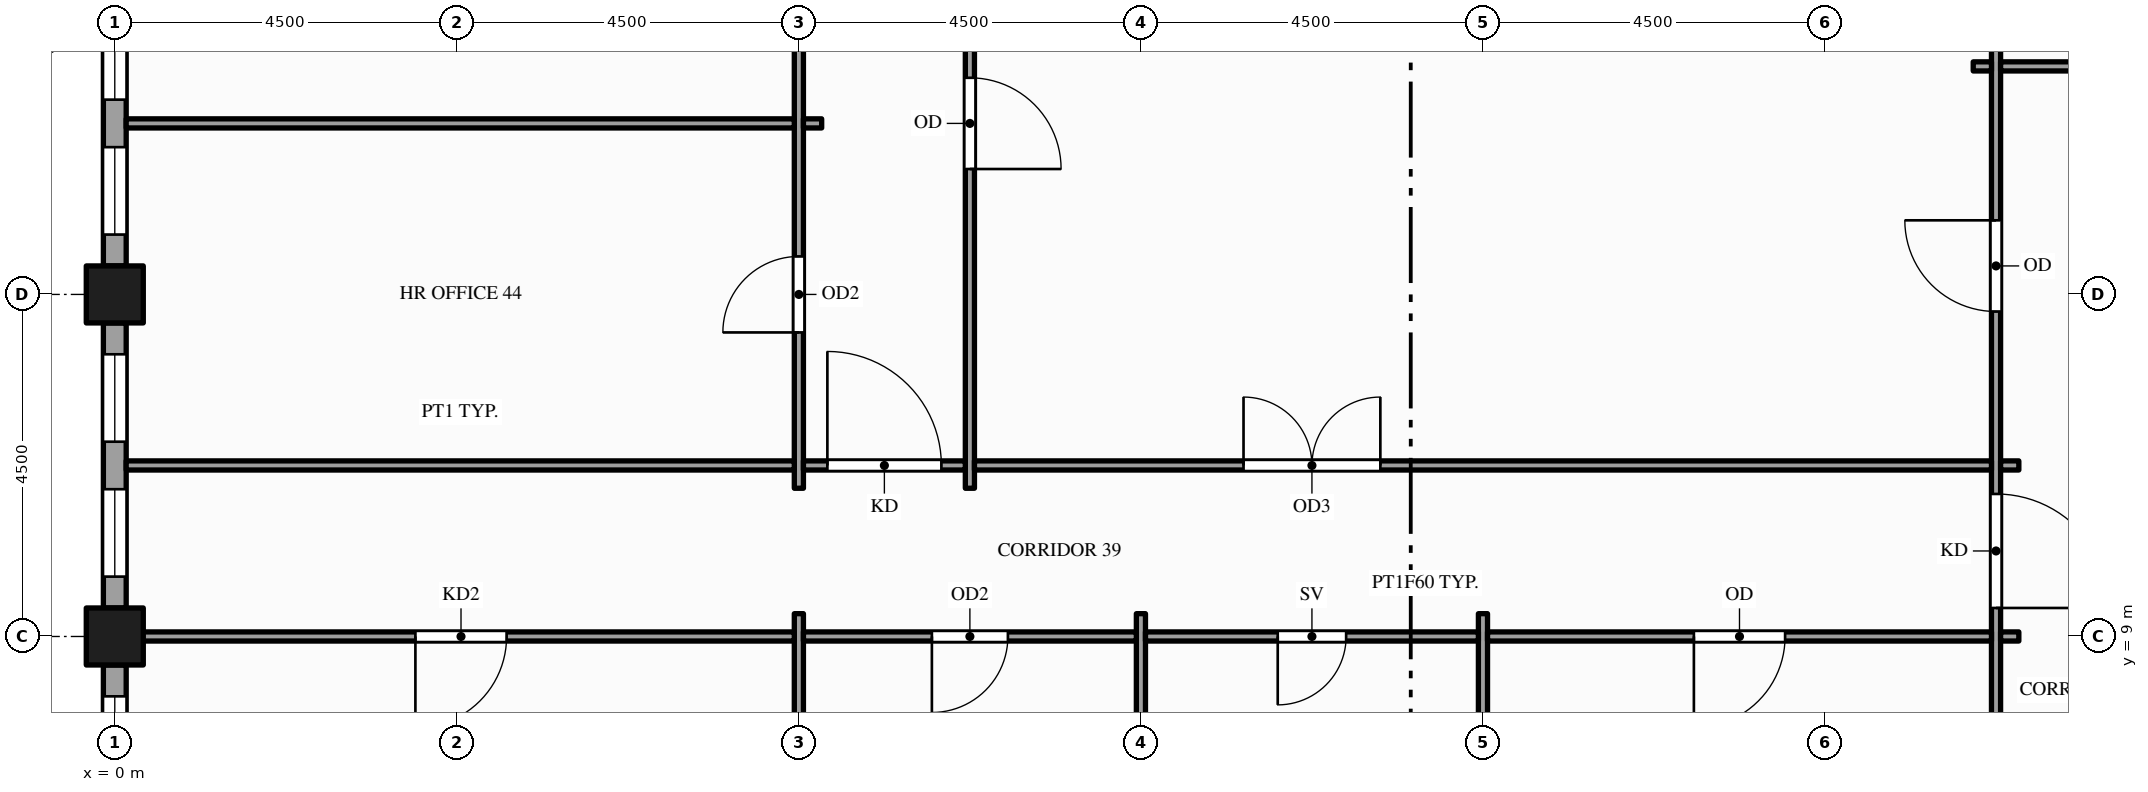
"""IFC4 building model, lengths in metres.
Left out: names, types, materials, properties, quantities, classifications, styles, units other than length and angle.
Written with IfcOpenShell. Run it as: python <this file> out.ifc"""

import sys

from ifc_helpers import new_model, si_unit, direction, frame, frame_2d, origin, origin_2d, place, context, subcontext, project, spatial, rectangle, hollow_rectangle, extrude, element, fill, save


model = new_model("IFC4")
c1 = context("Model", 3, precision=1e-05, world=origin(), true_north=direction((0.0, 1.0)))
c2 = subcontext(c1, "Body", "Model", "MODEL_VIEW")
j1 = project(units=[si_unit("LENGTHUNIT", "METRE"), si_unit("PLANEANGLEUNIT", "RADIAN")], contexts=[c1])
p1 = place(None, origin())
s1 = spatial("IfcSite", under=j1, at=p1, CompositionType="ELEMENT")
p2 = place(p1, origin())
s2 = spatial("IfcBuilding", under=s1, at=p2, CompositionType="ELEMENT")
p3 = place(p2, frame((0.0, 0.0, 195.0)))
s3 = spatial("IfcBuildingStorey", under=s2, at=p3, CompositionType="ELEMENT", Elevation=195.0)
for number, where, z_axis, x_axis in (
    (1, (0.0, 9.0, -0.15), (0.0, 0.0, 1.0), (1.0, 0.0, 0.0)),
    (2, (0.0, 13.5, -0.15), (0.0, 0.0, 1.0), (1.0, 0.0, 0.0)),
):
    element("IfcColumn", number, at=place(p3, frame(where, z_axis=z_axis, x_axis=x_axis)), inside=s3, PredefinedType="COLUMN", context=c2, shape_type="SweptSolid", body=[
        extrude(hollow_rectangle(XDim=0.75, YDim=0.75, WallThickness=0.036, at=origin_2d()), origin(), (0.0, 0.0, 1.0), 4.0),
    ])
p4 = place(p3, frame((0.0, 17.625, 0.0), z_axis=(0.0, 0.0, 1.0), x_axis=(0.0, -1.0, 0.0)))
e3 = element("IfcWall", 3, at=p4, inside=s3, PredefinedType="STANDARD", context=c2, shape_type="SweptSolid", body=[
    extrude(rectangle(XDim=3.75, YDim=0.3, at=frame_2d((1.875, 0.0))), origin(), (0.0, 0.0, 1.0), 3.157),
])
p5 = place(p4, frame((0.413, 0.0, 0.9)))
e4 = element("IfcOpeningElement", 4, at=p5, cuts=e3, PredefinedType="OPENING", context=c2, shape_type="SweptSolid", body=[
    extrude(rectangle(XDim=1.15, YDim=2.0, at=frame_2d((0.575, 1.0))), frame((0.0, 0.16, 0.0), z_axis=(0.0, -1.0, 0.0), x_axis=(1.0, 0.0, 0.0)), (0.0, 0.0, 1.0), 0.32),
])
p6 = place(p4, frame((2.188, 0.0, 0.9)))
e5 = element("IfcOpeningElement", 5, at=p6, cuts=e3, PredefinedType="OPENING", context=c2, shape_type="SweptSolid", body=[
    extrude(rectangle(XDim=1.15, YDim=2.0, at=frame_2d((0.575, 1.0))), frame((0.0, 0.16, 0.0), z_axis=(0.0, -1.0, 0.0), x_axis=(1.0, 0.0, 0.0)), (0.0, 0.0, 1.0), 0.32),
])
p7 = place(p3, frame((0.0, 13.125, 0.0), z_axis=(0.0, 0.0, 1.0), x_axis=(0.0, -1.0, 0.0)))
e6 = element("IfcWall", 6, at=p7, inside=s3, PredefinedType="STANDARD", context=c2, shape_type="SweptSolid", body=[
    extrude(rectangle(XDim=3.75, YDim=0.3, at=frame_2d((1.875, 0.0))), origin(), (0.0, 0.0, 1.0), 3.157),
])
p8 = place(p7, frame((0.413, 0.0, 0.9)))
e7 = element("IfcOpeningElement", 7, at=p8, cuts=e6, PredefinedType="OPENING", context=c2, shape_type="SweptSolid", body=[
    extrude(rectangle(XDim=1.15, YDim=2.0, at=frame_2d((0.575, 1.0))), frame((0.0, 0.16, 0.0), z_axis=(0.0, -1.0, 0.0), x_axis=(1.0, 0.0, 0.0)), (0.0, 0.0, 1.0), 0.32),
])
p9 = place(p7, frame((2.188, 0.0, 0.9)))
e8 = element("IfcOpeningElement", 8, at=p9, cuts=e6, PredefinedType="OPENING", context=c2, shape_type="SweptSolid", body=[
    extrude(rectangle(XDim=1.15, YDim=2.0, at=frame_2d((0.575, 1.0))), frame((0.0, 0.16, 0.0), z_axis=(0.0, -1.0, 0.0), x_axis=(1.0, 0.0, 0.0)), (0.0, 0.0, 1.0), 0.32),
])
p10 = place(p3, frame((0.0, 8.625, 0.0), z_axis=(0.0, 0.0, 1.0), x_axis=(0.0, -1.0, 0.0)))
e9 = element("IfcWall", 9, at=p10, inside=s3, PredefinedType="STANDARD", context=c2, shape_type="SweptSolid", body=[
    extrude(rectangle(XDim=3.75, YDim=0.3, at=frame_2d((1.875, 0.0))), origin(), (0.0, 0.0, 1.0), 3.157),
])
p11 = place(p10, frame((0.413, 0.0, 0.9)))
e10 = element("IfcOpeningElement", 10, at=p11, cuts=e9, PredefinedType="OPENING", context=c2, shape_type="SweptSolid", body=[
    extrude(rectangle(XDim=1.15, YDim=2.0, at=frame_2d((0.575, 1.0))), frame((0.0, 0.16, 0.0), z_axis=(0.0, -1.0, 0.0), x_axis=(1.0, 0.0, 0.0)), (0.0, 0.0, 1.0), 0.32),
])
p12 = place(p10, frame((2.188, 0.0, 0.9)))
e11 = element("IfcOpeningElement", 11, at=p12, cuts=e9, PredefinedType="OPENING", context=c2, shape_type="SweptSolid", body=[
    extrude(rectangle(XDim=1.15, YDim=2.0, at=frame_2d((0.575, 1.0))), frame((0.0, 0.16, 0.0), z_axis=(0.0, -1.0, 0.0), x_axis=(1.0, 0.0, 0.0)), (0.0, 0.0, 1.0), 0.32),
])
p13 = place(p3, frame((9.0, 3.875, 0.0), z_axis=(0.0, 0.0, 1.0), x_axis=(0.0, 1.0, 0.0)))
e12 = element("IfcWall", 12, at=p13, inside=s3, PredefinedType="PARTITIONING", context=c2, shape_type="SweptSolid", body=[
    extrude(rectangle(XDim=5.425, YDim=0.12, at=frame_2d((2.712, 0.0))), origin(), (0.0, 0.0, 1.0), 2.87),
])
p14 = place(p3, frame((9.0, 10.95, 0.0), z_axis=(0.0, 0.0, 1.0), x_axis=(0.0, 1.0, 0.0)))
e13 = element("IfcWall", 13, at=p14, inside=s3, PredefinedType="PARTITIONING", context=c2, shape_type="SweptSolid", body=[
    extrude(rectangle(XDim=20.85, YDim=0.12, at=frame_2d((10.425, 0.0))), origin(), (0.0, 0.0, 1.0), 2.6),
])
p15 = place(p14, frame((2.05, 0.0, 0.0)))
e14 = element("IfcOpeningElement", 14, at=p15, cuts=e13, PredefinedType="OPENING", context=c2, shape_type="SweptSolid", body=[
    extrude(rectangle(XDim=1.0, YDim=2.1, at=frame_2d((0.5, 1.05))), frame((0.0, 0.07, 0.0), z_axis=(0.0, -1.0, 0.0), x_axis=(1.0, 0.0, 0.0)), (0.0, 0.0, 1.0), 0.14),
])
p16 = place(p14, frame((6.55, 0.0, 0.0)))
e15 = element("IfcOpeningElement", 15, at=p16, cuts=e13, PredefinedType="OPENING", context=c2, shape_type="SweptSolid", body=[
    extrude(rectangle(XDim=1.0, YDim=2.1, at=frame_2d((0.5, 1.05))), frame((0.0, 0.07, 0.0), z_axis=(0.0, -1.0, 0.0), x_axis=(1.0, 0.0, 0.0)), (0.0, 0.0, 1.0), 0.14),
])
p17 = place(p14, frame((12.205, 0.0, 0.0)))
e16 = element("IfcOpeningElement", 16, at=p17, cuts=e13, PredefinedType="OPENING", context=c2, shape_type="SweptSolid", body=[
    extrude(rectangle(XDim=1.0, YDim=2.1, at=frame_2d((0.5, 1.05))), frame((0.0, 0.07, 0.0), z_axis=(0.0, -1.0, 0.0), x_axis=(1.0, 0.0, 0.0)), (0.0, 0.0, 1.0), 0.14),
])
p18 = place(p3, frame((11.25, 10.95, 0.0), z_axis=(0.0, 0.0, 1.0), x_axis=(0.0, 1.0, 0.0)))
e17 = element("IfcWall", 17, at=p18, inside=s3, PredefinedType="PARTITIONING", context=c2, shape_type="SweptSolid", body=[
    extrude(rectangle(XDim=20.85, YDim=0.12, at=frame_2d((10.425, 0.0))), origin(), (0.0, 0.0, 1.0), 2.6),
])
p19 = place(p18, frame((17.8, 0.0, 0.0)))
e18 = element("IfcOpeningElement", 18, at=p19, cuts=e17, PredefinedType="OPENING", context=c2, shape_type="SweptSolid", body=[
    extrude(rectangle(XDim=1.0, YDim=2.1, at=frame_2d((0.5, 1.05))), frame((0.0, 0.07, 0.0), z_axis=(0.0, -1.0, 0.0), x_axis=(1.0, 0.0, 0.0)), (0.0, 0.0, 1.0), 0.14),
])
p20 = place(p18, frame((4.2, 0.0, 0.0)))
e19 = element("IfcOpeningElement", 19, at=p20, cuts=e17, PredefinedType="OPENING", context=c2, shape_type="SweptSolid", body=[
    extrude(rectangle(XDim=1.2, YDim=2.1, at=frame_2d((0.6, 1.05))), frame((0.0, 0.07, 0.0), z_axis=(0.0, -1.0, 0.0), x_axis=(1.0, 0.0, 0.0)), (0.0, 0.0, 1.0), 0.14),
])
for number, where, z_axis, x_axis in (
    (20, (13.5, 0.15, 0.0), (0.0, 0.0, 1.0), (0.0, 1.0, 0.0)),
    (21, (18.0, 0.15, 0.0), (0.0, 0.0, 1.0), (0.0, 1.0, 0.0)),
):
    element("IfcWall", number, at=place(p3, frame(where, z_axis=z_axis, x_axis=x_axis)), inside=s3, PredefinedType="PARTITIONING", context=c2, shape_type="SweptSolid", body=[
        extrude(rectangle(XDim=9.15, YDim=0.12, at=frame_2d((4.575, 0.0))), origin(), (0.0, 0.0, 1.0), 2.87),
    ])
p21 = place(p3, frame((24.75, -1.35, 0.0), z_axis=(0.0, 0.0, 1.0), x_axis=(0.0, 1.0, 0.0)))
e22 = element("IfcWall", 22, at=p21, inside=s3, PredefinedType="PARTITIONING", context=c2, shape_type="SweptSolid", body=[
    extrude(rectangle(XDim=24.101, YDim=0.12, at=frame_2d((12.05, 0.0))), origin(), (0.0, 0.0, 1.0), 2.76),
])
p22 = place(p21, frame((10.725, 0.0, 0.0)))
e23 = element("IfcOpeningElement", 23, at=p22, cuts=e22, PredefinedType="OPENING", context=c2, shape_type="SweptSolid", body=[
    extrude(rectangle(XDim=1.5, YDim=2.1, at=frame_2d((0.75, 1.05))), frame((0.0, 0.07, 0.0), z_axis=(0.0, -1.0, 0.0), x_axis=(1.0, 0.0, 0.0)), (0.0, 0.0, 1.0), 0.14),
])
p23 = place(p21, frame((14.625, 0.0, 0.0)))
e24 = element("IfcOpeningElement", 24, at=p23, cuts=e22, PredefinedType="OPENING", context=c2, shape_type="SweptSolid", body=[
    extrude(rectangle(XDim=1.2, YDim=2.1, at=frame_2d((0.6, 1.05))), frame((0.0, 0.07, 0.0), z_axis=(0.0, -1.0, 0.0), x_axis=(1.0, 0.0, 0.0)), (0.0, 0.0, 1.0), 0.14),
])
p24 = place(p3, frame((0.15, 9.0, 0.0), z_axis=(0.0, 0.0, 1.0), x_axis=(1.0, 0.0, 0.0)))
e25 = element("IfcWall", 25, at=p24, inside=s3, PredefinedType="PARTITIONING", context=c2, shape_type="SweptSolid", body=[
    extrude(rectangle(XDim=8.79, YDim=0.12, at=frame_2d((4.395, 0.0))), origin(), (0.0, 0.0, 1.0), 2.87),
])
p25 = place(p24, frame((3.805, 0.0, 0.0)))
e26 = element("IfcOpeningElement", 26, at=p25, cuts=e25, PredefinedType="OPENING", context=c2, shape_type="SweptSolid", body=[
    extrude(rectangle(XDim=1.2, YDim=2.1, at=frame_2d((0.6, 1.05))), frame((0.0, 0.07, 0.0), z_axis=(0.0, -1.0, 0.0), x_axis=(1.0, 0.0, 0.0)), (0.0, 0.0, 1.0), 0.14),
])
p26 = place(p3, frame((9.06, 9.0, 0.0), z_axis=(0.0, 0.0, 1.0), x_axis=(1.0, 0.0, 0.0)))
e27 = element("IfcWall", 27, at=p26, inside=s3, PredefinedType="PARTITIONING", context=c2, shape_type="SweptSolid", body=[
    extrude(rectangle(XDim=4.38, YDim=0.12, at=frame_2d((2.19, 0.0))), origin(), (0.0, 0.0, 1.0), 2.87),
])
p27 = place(p26, frame((1.69, 0.0, 0.0)))
e28 = element("IfcOpeningElement", 28, at=p27, cuts=e27, PredefinedType="OPENING", context=c2, shape_type="SweptSolid", body=[
    extrude(rectangle(XDim=1.0, YDim=2.1, at=frame_2d((0.5, 1.05))), frame((0.0, 0.07, 0.0), z_axis=(0.0, -1.0, 0.0), x_axis=(1.0, 0.0, 0.0)), (0.0, 0.0, 1.0), 0.14),
])
p28 = place(p3, frame((13.56, 9.0, 0.0), z_axis=(0.0, 0.0, 1.0), x_axis=(1.0, 0.0, 0.0)))
e29 = element("IfcWall", 29, at=p28, inside=s3, PredefinedType="PARTITIONING", context=c2, shape_type="SweptSolid", body=[
    extrude(rectangle(XDim=4.38, YDim=0.12, at=frame_2d((2.19, 0.0))), origin(), (0.0, 0.0, 1.0), 2.87),
])
p29 = place(p28, frame((1.74, 0.0, 0.0)))
e30 = element("IfcOpeningElement", 30, at=p29, cuts=e29, PredefinedType="OPENING", context=c2, shape_type="SweptSolid", body=[
    extrude(rectangle(XDim=0.9, YDim=2.1, at=frame_2d((0.45, 1.05))), frame((0.0, 0.07, 0.0), z_axis=(0.0, -1.0, 0.0), x_axis=(1.0, 0.0, 0.0)), (0.0, 0.0, 1.0), 0.14),
])
p30 = place(p3, frame((18.06, 9.0, 0.0), z_axis=(0.0, 0.0, 1.0), x_axis=(1.0, 0.0, 0.0)))
e31 = element("IfcWall", 31, at=p30, inside=s3, PredefinedType="PARTITIONING", context=c2, shape_type="SweptSolid", body=[
    extrude(rectangle(XDim=6.63, YDim=0.12, at=frame_2d((3.315, 0.0))), origin(), (0.0, 0.0, 1.0), 2.76),
])
p31 = place(p30, frame((2.715, 0.0, 0.0)))
e32 = element("IfcOpeningElement", 32, at=p31, cuts=e31, PredefinedType="OPENING", context=c2, shape_type="SweptSolid", body=[
    extrude(rectangle(XDim=1.2, YDim=2.1, at=frame_2d((0.6, 1.05))), frame((0.0, 0.07, 0.0), z_axis=(0.0, -1.0, 0.0), x_axis=(1.0, 0.0, 0.0)), (0.0, 0.0, 1.0), 0.14),
])
p32 = place(p3, frame((24.81, 9.0, 0.0), z_axis=(0.0, 0.0, 1.0), x_axis=(1.0, 0.0, 0.0)))
e33 = element("IfcWall", 33, at=p32, inside=s3, PredefinedType="PARTITIONING", context=c2, shape_type="SweptSolid", body=[
    extrude(rectangle(XDim=0.24, YDim=0.12, at=frame_2d((0.12, 0.0))), origin(), (0.0, 0.0, 1.0), 2.76),
])
p33 = place(p3, frame((0.15, 11.25, 0.0), z_axis=(0.0, 0.0, 1.0), x_axis=(1.0, 0.0, 0.0)))
e34 = element("IfcWall", 34, at=p33, inside=s3, PredefinedType="PARTITIONING", context=c2, shape_type="SweptSolid", body=[
    extrude(rectangle(XDim=8.79, YDim=0.12, at=frame_2d((4.395, 0.0))), origin(), (0.0, 0.0, 1.0), 2.87),
])
p34 = place(p3, frame((9.06, 11.25, 0.0), z_axis=(0.0, 0.0, 1.0), x_axis=(1.0, 0.0, 0.0)))
e35 = element("IfcWall", 35, at=p34, inside=s3, PredefinedType="PARTITIONING", context=c2, shape_type="SweptSolid", body=[
    extrude(rectangle(XDim=2.13, YDim=0.12, at=frame_2d((1.065, 0.0))), origin(), (0.0, 0.0, 1.0), 2.87),
])
p35 = place(p34, frame((0.315, 0.0, 0.0)))
e36 = element("IfcOpeningElement", 36, at=p35, cuts=e35, PredefinedType="OPENING", context=c2, shape_type="SweptSolid", body=[
    extrude(rectangle(XDim=1.5, YDim=2.1, at=frame_2d((0.75, 1.05))), frame((0.0, 0.07, 0.0), z_axis=(0.0, -1.0, 0.0), x_axis=(1.0, 0.0, 0.0)), (0.0, 0.0, 1.0), 0.14),
])
p36 = place(p3, frame((11.31, 11.25, 0.0), z_axis=(0.0, 0.0, 1.0), x_axis=(1.0, 0.0, 0.0)))
e37 = element("IfcWall", 37, at=p36, inside=s3, PredefinedType="PARTITIONING", context=c2, shape_type="SweptSolid", body=[
    extrude(rectangle(XDim=13.38, YDim=0.12, at=frame_2d((6.69, 0.0))), origin(), (0.0, 0.0, 1.0), 2.76),
])
p37 = place(p36, frame((3.54, 0.0, 0.0)))
e38 = element("IfcOpeningElement", 38, at=p37, cuts=e37, PredefinedType="OPENING", context=c2, shape_type="SweptSolid", body=[
    extrude(rectangle(XDim=1.8, YDim=2.1, at=frame_2d((0.9, 1.05))), frame((0.0, 0.07, 0.0), z_axis=(0.0, -1.0, 0.0), x_axis=(1.0, 0.0, 0.0)), (0.0, 0.0, 1.0), 0.14),
])
p38 = place(p3, frame((24.81, 11.25, 0.0), z_axis=(0.0, 0.0, 1.0), x_axis=(1.0, 0.0, 0.0)))
e39 = element("IfcWall", 39, at=p38, inside=s3, PredefinedType="PARTITIONING", context=c2, shape_type="SweptSolid", body=[
    extrude(rectangle(XDim=0.24, YDim=0.12, at=frame_2d((0.12, 0.0))), origin(), (0.0, 0.0, 1.0), 2.76),
])
p39 = place(p3, frame((0.15, 15.75, 0.0), z_axis=(0.0, 0.0, 1.0), x_axis=(1.0, 0.0, 0.0)))
e40 = element("IfcWall", 40, at=p39, inside=s3, PredefinedType="PARTITIONING", context=c2, shape_type="SweptSolid", body=[
    extrude(rectangle(XDim=8.79, YDim=0.12, at=frame_2d((4.395, 0.0))), origin(), (0.0, 0.0, 1.0), 2.87),
])
p40 = place(p3, frame((9.06, 15.75, 0.0), z_axis=(0.0, 0.0, 1.0), x_axis=(1.0, 0.0, 0.0)))
e41 = element("IfcWall", 41, at=p40, inside=s3, PredefinedType="PARTITIONING", context=c2, shape_type="SweptSolid", body=[
    extrude(rectangle(XDim=0.24, YDim=0.12, at=frame_2d((0.12, 0.0))), origin(), (0.0, 0.0, 1.0), 2.87),
])
p41 = place(p3, frame((24.45, 16.5, 0.0), z_axis=(0.0, 0.0, 1.0), x_axis=(1.0, 0.0, 0.0)))
e42 = element("IfcWall", 42, at=p41, inside=s3, PredefinedType="PARTITIONING", context=c2, shape_type="SweptSolid", body=[
    extrude(rectangle(XDim=0.24, YDim=0.12, at=frame_2d((0.12, 0.0))), origin(), (0.0, 0.0, 1.0), 2.76),
])
p42 = place(p3, frame((24.81, 16.5, 0.0), z_axis=(0.0, 0.0, 1.0), x_axis=(1.0, 0.0, 0.0)))
e43 = element("IfcWall", 43, at=p42, inside=s3, PredefinedType="PARTITIONING", context=c2, shape_type="SweptSolid", body=[
    extrude(rectangle(XDim=2.13, YDim=0.12, at=frame_2d((1.065, 0.0))), origin(), (0.0, 0.0, 1.0), 2.76),
])
p43 = place(p5, origin())
e44 = element("IfcWindow", 44, at=p43, inside=s3, PartitioningType="SINGLE_PANEL", PredefinedType="WINDOW", context=c2, shape_type="SweptSolid", body=[
    extrude(rectangle(XDim=1.15, YDim=2.0, at=frame_2d((0.575, 1.0))), frame((0.0, 0.03, 0.0), z_axis=(0.0, -1.0, 0.0), x_axis=(1.0, 0.0, 0.0)), (0.0, 0.0, 1.0), 0.06),
])
fill(e4, e44)
p44 = place(p6, origin())
e45 = element("IfcWindow", 45, at=p44, inside=s3, PartitioningType="SINGLE_PANEL", PredefinedType="WINDOW", context=c2, shape_type="SweptSolid", body=[
    extrude(rectangle(XDim=1.15, YDim=2.0, at=frame_2d((0.575, 1.0))), frame((0.0, 0.03, 0.0), z_axis=(0.0, -1.0, 0.0), x_axis=(1.0, 0.0, 0.0)), (0.0, 0.0, 1.0), 0.06),
])
fill(e5, e45)
p45 = place(p8, origin())
e46 = element("IfcWindow", 46, at=p45, inside=s3, PartitioningType="SINGLE_PANEL", PredefinedType="WINDOW", context=c2, shape_type="SweptSolid", body=[
    extrude(rectangle(XDim=1.15, YDim=2.0, at=frame_2d((0.575, 1.0))), frame((0.0, 0.03, 0.0), z_axis=(0.0, -1.0, 0.0), x_axis=(1.0, 0.0, 0.0)), (0.0, 0.0, 1.0), 0.06),
])
fill(e7, e46)
p46 = place(p9, origin())
e47 = element("IfcWindow", 47, at=p46, inside=s3, PartitioningType="SINGLE_PANEL", PredefinedType="WINDOW", context=c2, shape_type="SweptSolid", body=[
    extrude(rectangle(XDim=1.15, YDim=2.0, at=frame_2d((0.575, 1.0))), frame((0.0, 0.03, 0.0), z_axis=(0.0, -1.0, 0.0), x_axis=(1.0, 0.0, 0.0)), (0.0, 0.0, 1.0), 0.06),
])
fill(e8, e47)
p47 = place(p11, origin())
e48 = element("IfcWindow", 48, at=p47, inside=s3, PartitioningType="SINGLE_PANEL", PredefinedType="WINDOW", context=c2, shape_type="SweptSolid", body=[
    extrude(rectangle(XDim=1.15, YDim=2.0, at=frame_2d((0.575, 1.0))), frame((0.0, 0.03, 0.0), z_axis=(0.0, -1.0, 0.0), x_axis=(1.0, 0.0, 0.0)), (0.0, 0.0, 1.0), 0.06),
])
fill(e10, e48)
p48 = place(p22, origin())
e49 = element("IfcDoor", 49, at=p48, inside=s3, OperationType="SINGLE_SWING_LEFT", PredefinedType="DOOR", context=c2, shape_type="SweptSolid", body=[
    extrude(rectangle(XDim=1.5, YDim=2.1, at=frame_2d((0.75, 1.05))), frame((0.0, 0.025, 0.0), z_axis=(0.0, -1.0, 0.0), x_axis=(1.0, 0.0, 0.0)), (0.0, 0.0, 1.0), 0.05),
])
fill(e23, e49)
p49 = place(p25, origin())
e50 = element("IfcDoor", 50, at=p49, inside=s3, OperationType="SINGLE_SWING_LEFT", PredefinedType="DOOR", context=c2, shape_type="SweptSolid", body=[
    extrude(rectangle(XDim=1.2, YDim=2.1, at=frame_2d((0.6, 1.05))), frame((0.0, 0.025, 0.0), z_axis=(0.0, -1.0, 0.0), x_axis=(1.0, 0.0, 0.0)), (0.0, 0.0, 1.0), 0.05),
])
fill(e26, e50)
p50 = place(p27, origin())
e51 = element("IfcDoor", 51, at=p50, inside=s3, OperationType="SINGLE_SWING_LEFT", PredefinedType="DOOR", context=c2, shape_type="SweptSolid", body=[
    extrude(rectangle(XDim=1.0, YDim=2.1, at=frame_2d((0.5, 1.05))), frame((0.0, 0.025, 0.0), z_axis=(0.0, -1.0, 0.0), x_axis=(1.0, 0.0, 0.0)), (0.0, 0.0, 1.0), 0.05),
])
fill(e28, e51)
p51 = place(p29, origin())
e52 = element("IfcDoor", 52, at=p51, inside=s3, OperationType="SINGLE_SWING_LEFT", PredefinedType="DOOR", context=c2, shape_type="SweptSolid", body=[
    extrude(rectangle(XDim=0.9, YDim=2.1, at=frame_2d((0.45, 1.05))), frame((0.0, 0.025, 0.0), z_axis=(0.0, -1.0, 0.0), x_axis=(1.0, 0.0, 0.0)), (0.0, 0.0, 1.0), 0.05),
])
fill(e30, e52)
p52 = place(p31, origin())
e53 = element("IfcDoor", 53, at=p52, inside=s3, OperationType="SINGLE_SWING_LEFT", PredefinedType="DOOR", context=c2, shape_type="SweptSolid", body=[
    extrude(rectangle(XDim=1.2, YDim=2.1, at=frame_2d((0.6, 1.05))), frame((0.0, 0.025, 0.0), z_axis=(0.0, -1.0, 0.0), x_axis=(1.0, 0.0, 0.0)), (0.0, 0.0, 1.0), 0.05),
])
fill(e32, e53)
p53 = place(p37, origin())
e54 = element("IfcDoor", 54, at=p53, inside=s3, OperationType="DOUBLE_DOOR_SINGLE_SWING", PredefinedType="DOOR", context=c2, shape_type="SweptSolid", body=[
    extrude(rectangle(XDim=1.8, YDim=2.1, at=frame_2d((0.9, 1.05))), frame((0.0, 0.025, 0.0), z_axis=(0.0, -1.0, 0.0), x_axis=(1.0, 0.0, 0.0)), (0.0, 0.0, 1.0), 0.05),
])
fill(e38, e54)
p54 = place(p35, origin())
e55 = element("IfcDoor", 55, at=p54, inside=s3, OperationType="SINGLE_SWING_LEFT", PredefinedType="DOOR", context=c2, shape_type="SweptSolid", body=[
    extrude(rectangle(XDim=1.5, YDim=2.1, at=frame_2d((0.75, 1.05))), frame((0.0, 0.025, 0.0), z_axis=(0.0, -1.0, 0.0), x_axis=(1.0, 0.0, 0.0)), (0.0, 0.0, 1.0), 0.05),
])
fill(e36, e55)
p55 = place(p15, origin())
e56 = element("IfcDoor", 56, at=p55, inside=s3, OperationType="SINGLE_SWING_LEFT", PredefinedType="DOOR", context=c2, shape_type="SweptSolid", body=[
    extrude(rectangle(XDim=1.0, YDim=2.1, at=frame_2d((0.5, 1.05))), frame((0.0, 0.025, 0.0), z_axis=(0.0, -1.0, 0.0), x_axis=(1.0, 0.0, 0.0)), (0.0, 0.0, 1.0), 0.05),
])
fill(e14, e56)
p56 = place(p20, origin())
e57 = element("IfcDoor", 57, at=p56, inside=s3, OperationType="SINGLE_SWING_LEFT", PredefinedType="DOOR", context=c2, shape_type="SweptSolid", body=[
    extrude(rectangle(XDim=1.2, YDim=2.1, at=frame_2d((0.6, 1.05))), frame((0.0, 0.025, 0.0), z_axis=(0.0, -1.0, 0.0), x_axis=(1.0, 0.0, 0.0)), (0.0, 0.0, 1.0), 0.05),
])
fill(e19, e57)
p57 = place(p23, origin())
e58 = element("IfcDoor", 58, at=p57, inside=s3, OperationType="SINGLE_SWING_RIGHT", PredefinedType="DOOR", context=c2, shape_type="SweptSolid", body=[
    extrude(rectangle(XDim=1.2, YDim=2.1, at=frame_2d((0.6, 1.05))), frame((0.0, 0.025, 0.0), z_axis=(0.0, -1.0, 0.0), x_axis=(1.0, 0.0, 0.0)), (0.0, 0.0, 1.0), 0.05),
])
fill(e24, e58)
save(model, sys.argv[1])
